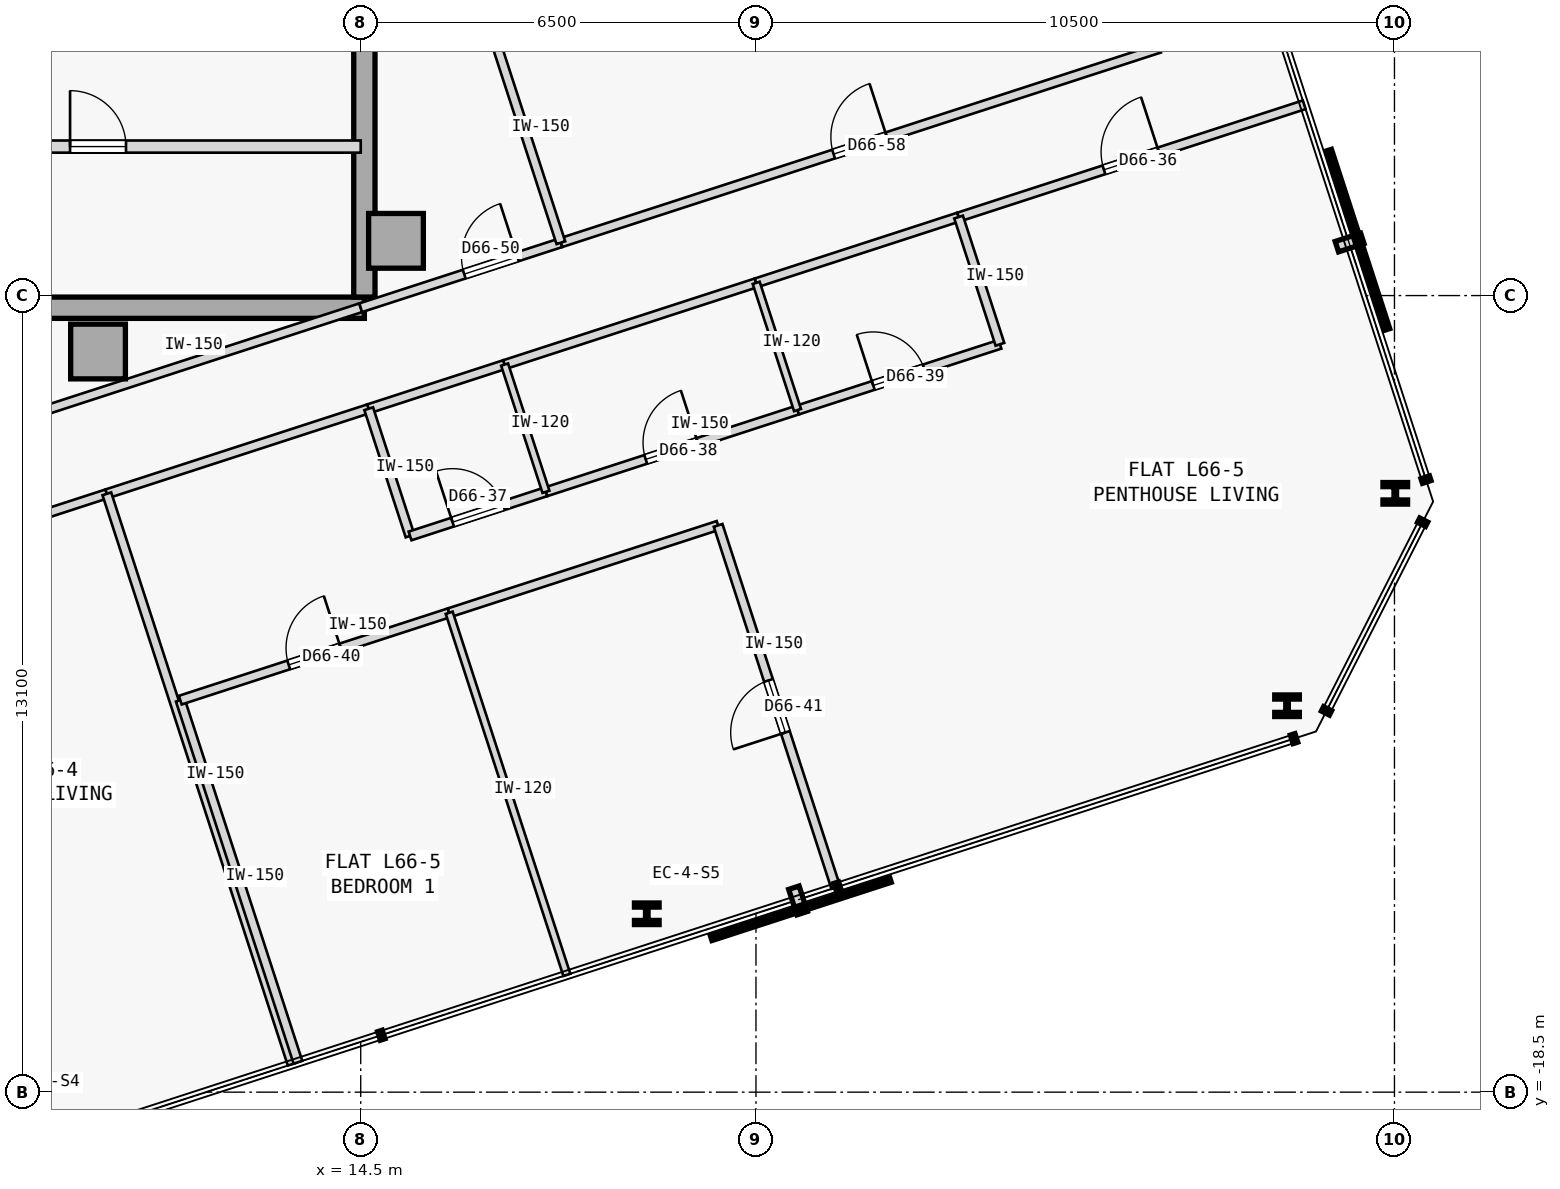
"""IFC4 building model, lengths in metres.
Left out: names, types, materials, properties, quantities, classifications, styles, units other than length and angle.
Written with IfcOpenShell. Run it as: python <this file> out.ifc"""

import sys

from ifc_helpers import new_model, si_unit, direction, frame, frame_2d, origin, origin_2d, place, context, subcontext, project, spatial, rectangle, i_section, extrude, element, fill, save


model = new_model("IFC4")
c1 = context("Model", 3, precision=1e-05, world=origin(), true_north=direction((0.0, 1.0)))
c2 = subcontext(c1, "Body", "Model", "MODEL_VIEW")
j1 = project(units=[si_unit("LENGTHUNIT", "METRE"), si_unit("PLANEANGLEUNIT", "RADIAN")], contexts=[c1])
p1 = place(None, origin())
s1 = spatial("IfcSite", under=j1, at=p1, CompositionType="ELEMENT")
p2 = place(p1, origin())
s2 = spatial("IfcBuilding", under=s1, at=p2, CompositionType="ELEMENT")
p3 = place(p2, frame((0.0, 0.0, 247.75)))
s3 = spatial("IfcBuildingStorey", under=s2, at=p3, CompositionType="ELEMENT", Elevation=247.75)
for number, where, z_axis, x_axis in (
    (1, (15.08, -4.5, 0.0), (0.0, 0.0, 1.0), (1.0, 0.0, 0.0)),
    (2, (10.18, -6.32, 0.0), (0.0, 0.0, 1.0), (1.0, 0.0, 0.0)),
):
    element("IfcColumn", number, at=place(p3, frame(where, z_axis=z_axis, x_axis=x_axis)), inside=s3, PredefinedType="COLUMN", context=c2, shape_type="SweptSolid", body=[
        extrude(rectangle(XDim=0.9, YDim=0.9, at=origin_2d()), origin(), (0.0, 0.0, 1.0), 3.35),
    ])
p4 = place(p3, frame((3.7, -5.6, 0.0), z_axis=(0.0, 0.0, 1.0), x_axis=(1.0, 0.0, 0.0)))
e3 = element("IfcWall", 3, at=p4, inside=s3, PredefinedType="SHEAR", context=c2, shape_type="SweptSolid", body=[
    extrude(rectangle(XDim=10.86, YDim=0.35, at=frame_2d((5.43, 0.0))), origin(), (0.0, 0.0, 1.0), 3.125),
])
p5 = place(p3, frame((14.56, -5.425, 0.0), z_axis=(0.0, 0.0, 1.0), x_axis=(0.0, 1.0, 0.0)))
e4 = element("IfcWall", 4, at=p5, inside=s3, PredefinedType="SHEAR", context=c2, shape_type="SweptSolid", body=[
    extrude(rectangle(XDim=10.85, YDim=0.35, at=frame_2d((5.425, 0.0))), origin(), (0.0, 0.0, 1.0), 3.125),
])
for number, where, z_axis, x_axis in (
    (5, (19.204, -15.566, 0.0), (0.0, 0.0, 1.0), (1.0, 0.0, 0.0)),
    (6, (29.734, -12.145, 0.0), (0.0, 0.0, 1.0), (1.0, 0.0, 0.0)),
    (7, (31.513, -8.652, 0.0), (0.0, 0.0, 1.0), (1.0, 0.0, 0.0)),
):
    element("IfcColumn", number, at=place(p3, frame(where, z_axis=z_axis, x_axis=x_axis)), inside=s3, PredefinedType="COLUMN", context=c2, shape_type="SweptSolid", body=[
        extrude(i_section(OverallWidth=0.405, OverallDepth=0.355, WebThickness=0.042, FlangeThickness=0.068, FilletRadius=0.015, at=origin_2d()), origin(), (0.0, 0.0, 1.0), 3.35),
    ])
p6 = place(p3, frame((3.7, -2.95, 0.0), z_axis=(0.0, 0.0, 1.0), x_axis=(1.0, 0.0, 0.0)))
e8 = element("IfcWall", 8, at=p6, inside=s3, PredefinedType="STANDARD", context=c2, shape_type="SweptSolid", body=[
    extrude(rectangle(XDim=10.8, YDim=0.2, at=frame_2d((5.4, 0.0))), origin(), (0.0, 0.0, 1.0), 3.125),
])
p7 = place(p6, frame((0.53, 0.0, 0.0)))
e9 = element("IfcOpeningElement", 9, at=p7, cuts=e8, PredefinedType="OPENING", context=c2, shape_type="SweptSolid", body=[
    extrude(rectangle(XDim=1.1, YDim=2.15, at=frame_2d((0.55, 1.075))), frame((0.0, 0.11, 0.0), z_axis=(0.0, -1.0, 0.0), x_axis=(1.0, 0.0, 0.0)), (0.0, 0.0, 1.0), 0.22),
])
p8 = place(p6, frame((6.02, 0.0, 0.0)))
e10 = element("IfcOpeningElement", 10, at=p8, cuts=e8, PredefinedType="OPENING", context=c2, shape_type="SweptSolid", body=[
    extrude(rectangle(XDim=0.92, YDim=2.15, at=frame_2d((0.46, 1.075))), frame((0.0, 0.11, 0.0), z_axis=(0.0, -1.0, 0.0), x_axis=(1.0, 0.0, 0.0)), (0.0, 0.0, 1.0), 0.22),
])
p9 = place(p3, frame((5.174, -10.334, 0.0), z_axis=(0.0, 0.0, 1.0), x_axis=(0.951058579685, 0.30901064384, 0.0)))
e11 = element("IfcWall", 11, at=p9, inside=s3, PredefinedType="PARTITIONING", context=c2, shape_type="SweptSolid", body=[
    extrude(rectangle(XDim=5.416, YDim=0.15, at=frame_2d((2.708, 0.0))), origin(), (0.0, 0.0, 1.0), 3.125),
])
p10 = place(p9, frame((2.233, 0.0, 0.0)))
e12 = element("IfcOpeningElement", 12, at=p10, cuts=e11, PredefinedType="OPENING", context=c2, shape_type="SweptSolid", body=[
    extrude(rectangle(XDim=0.95, YDim=2.15, at=frame_2d((0.475, 1.075))), frame((0.0, 0.085, 0.0), z_axis=(0.0, -1.0, 0.0), x_axis=(1.0, 0.0, 0.0)), (0.0, 0.0, 1.0), 0.17),
])
p11 = place(p3, frame((10.325, -8.66, 0.0), z_axis=(0.0, 0.0, 1.0), x_axis=(0.95106061278, 0.309004386407, 0.0)))
e13 = element("IfcWall", 13, at=p11, inside=s3, PredefinedType="PARTITIONING", context=c2, shape_type="SweptSolid", body=[
    extrude(rectangle(XDim=4.528, YDim=0.15, at=frame_2d((2.264, 0.0))), origin(), (0.0, 0.0, 1.0), 3.125),
])
p12 = place(p3, frame((24.332, -4.109, 0.0), z_axis=(0.0, 0.0, 1.0), x_axis=(0.951058083458, 0.309012171103, 0.0)))
e14 = element("IfcWall", 14, at=p12, inside=s3, PredefinedType="PARTITIONING", context=c2, shape_type="SweptSolid", body=[
    extrude(rectangle(XDim=5.976, YDim=0.15, at=frame_2d((2.988, 0.0))), origin(), (0.0, 0.0, 1.0), 3.125),
])
p13 = place(p12, frame((2.513, 0.0, 0.0)))
e15 = element("IfcOpeningElement", 15, at=p13, cuts=e14, PredefinedType="OPENING", context=c2, shape_type="SweptSolid", body=[
    extrude(rectangle(XDim=0.95, YDim=2.15, at=frame_2d((0.475, 1.075))), frame((0.0, 0.085, 0.0), z_axis=(0.0, -1.0, 0.0), x_axis=(1.0, 0.0, 0.0)), (0.0, 0.0, 1.0), 0.17),
])
p14 = place(p3, frame((14.631, -7.261, 0.0), z_axis=(0.0, 0.0, 1.0), x_axis=(0.951066131077, 0.308987401554, 0.0)))
e16 = element("IfcWall", 16, at=p14, inside=s3, PredefinedType="PARTITIONING", context=c2, shape_type="SweptSolid", body=[
    extrude(rectangle(XDim=2.35, YDim=0.15, at=frame_2d((1.175, 0.0))), origin(), (0.0, 0.0, 1.0), 3.125),
])
p15 = place(p3, frame((16.866, -6.535, 0.0), z_axis=(0.0, 0.0, 1.0), x_axis=(0.951041492154, 0.309063230101, 0.0)))
e17 = element("IfcWall", 17, at=p15, inside=s3, PredefinedType="PARTITIONING", context=c2, shape_type="SweptSolid", body=[
    extrude(rectangle(XDim=4.35, YDim=0.15, at=frame_2d((2.175, 0.0))), origin(), (0.0, 0.0, 1.0), 3.125),
])
p16 = place(p3, frame((21.003, -5.19, 0.0), z_axis=(0.0, 0.0, 1.0), x_axis=(0.951055596592, 0.309019824916, 0.0)))
e18 = element("IfcWall", 18, at=p16, inside=s3, PredefinedType="PARTITIONING", context=c2, shape_type="SweptSolid", body=[
    extrude(rectangle(XDim=3.5, YDim=0.15, at=frame_2d((1.75, 0.0))), origin(), (0.0, 0.0, 1.0), 3.125),
])
p17 = place(p3, frame((7.588, -7.846, 0.0), z_axis=(0.0, 0.0, 1.0), x_axis=(0.951058013903, 0.309012385174, 0.0)))
e19 = element("IfcWall", 19, at=p17, inside=s3, PredefinedType="PARTITIONING", context=c2, shape_type="SweptSolid", body=[
    extrude(rectangle(XDim=7.267, YDim=0.15, at=frame_2d((3.634, 0.0))), origin(), (0.0, 0.0, 1.0), 3.125),
])
p18 = place(p17, frame((0.557, 0.0, 0.0)))
e20 = element("IfcOpeningElement", 20, at=p18, cuts=e19, PredefinedType="OPENING", context=c2, shape_type="SweptSolid", body=[
    extrude(rectangle(XDim=0.92, YDim=2.15, at=frame_2d((0.46, 1.075))), frame((0.0, 0.085, 0.0), z_axis=(0.0, -1.0, 0.0), x_axis=(1.0, 0.0, 0.0)), (0.0, 0.0, 1.0), 0.17),
])
p19 = place(p3, frame((14.5, -5.6, 0.0), z_axis=(0.0, 0.0, 1.0), x_axis=(0.951047546178, 0.309044600193, 0.0)))
e21 = element("IfcWall", 21, at=p19, inside=s3, PredefinedType="PARTITIONING", context=c2, shape_type="SweptSolid", body=[
    extrude(rectangle(XDim=3.461, YDim=0.15, at=frame_2d((1.73, 0.0))), origin(), (0.0, 0.0, 1.0), 3.125),
])
p20 = place(p19, frame((1.79, 0.0, 0.0)))
e22 = element("IfcOpeningElement", 22, at=p20, cuts=e21, PredefinedType="OPENING", context=c2, shape_type="SweptSolid", body=[
    extrude(rectangle(XDim=0.92, YDim=2.15, at=frame_2d((0.46, 1.075))), frame((0.0, 0.085, 0.0), z_axis=(0.0, -1.0, 0.0), x_axis=(1.0, 0.0, 0.0)), (0.0, 0.0, 1.0), 0.17),
])
p21 = place(p3, frame((17.791, -4.531, 0.0), z_axis=(0.0, 0.0, 1.0), x_axis=(0.951056769902, 0.309016213852, 0.0)))
e23 = element("IfcWall", 23, at=p21, inside=s3, PredefinedType="PARTITIONING", context=c2, shape_type="SweptSolid", body=[
    extrude(rectangle(XDim=10.352, YDim=0.15, at=frame_2d((5.176, 0.0))), origin(), (0.0, 0.0, 1.0), 3.125),
])
p22 = place(p21, frame((4.716, 0.0, 0.0)))
e24 = element("IfcOpeningElement", 24, at=p22, cuts=e23, PredefinedType="OPENING", context=c2, shape_type="SweptSolid", body=[
    extrude(rectangle(XDim=0.92, YDim=2.15, at=frame_2d((0.46, 1.075))), frame((0.0, 0.085, 0.0), z_axis=(0.0, -1.0, 0.0), x_axis=(1.0, 0.0, 0.0)), (0.0, 0.0, 1.0), 0.17),
])
p23 = place(p3, frame((13.372, -18.04, 0.0), z_axis=(0.0, 0.0, 1.0), x_axis=(-0.308999867152, 0.951062081097, 0.0)))
e25 = element("IfcWall", 25, at=p23, inside=s3, PredefinedType="PARTITIONING", context=c2, shape_type="SweptSolid", body=[
    extrude(rectangle(XDim=9.862, YDim=0.15, at=frame_2d((4.931, 0.0))), origin(), (0.0, 0.0, 1.0), 3.125),
])
p24 = place(p3, frame((15.311, -9.353, 0.0), z_axis=(0.0, 0.0, 1.0), x_axis=(-0.308960600764, 0.951074837842, 0.0)))
e26 = element("IfcWall", 26, at=p24, inside=s3, PredefinedType="PARTITIONING", context=c2, shape_type="SweptSolid", body=[
    extrude(rectangle(XDim=2.2, YDim=0.15, at=frame_2d((1.1, 0.0))), origin(), (0.0, 0.0, 1.0), 3.125),
])
p25 = place(p3, frame((15.311, -9.353, 0.0), z_axis=(0.0, 0.0, 1.0), x_axis=(0.951076048914, 0.308956872689, 0.0)))
e27 = element("IfcWall", 27, at=p25, inside=s3, PredefinedType="PARTITIONING", context=c2, shape_type="SweptSolid", body=[
    extrude(rectangle(XDim=2.35, YDim=0.15, at=frame_2d((1.175, 0.0))), origin(), (0.0, 0.0, 1.0), 3.125),
])
p26 = place(p25, frame((0.735, 0.0, 0.0)))
e28 = element("IfcOpeningElement", 28, at=p26, cuts=e27, PredefinedType="OPENING", context=c2, shape_type="SweptSolid", body=[
    extrude(rectangle(XDim=0.88, YDim=2.15, at=frame_2d((0.44, 1.075))), frame((0.0, 0.085, 0.0), z_axis=(0.0, -1.0, 0.0), x_axis=(1.0, 0.0, 0.0)), (0.0, 0.0, 1.0), 0.17),
])
p27 = place(p3, frame((17.546, -8.627, 0.0), z_axis=(0.0, 0.0, 1.0), x_axis=(0.951052627573, 0.309028962374, 0.0)))
e29 = element("IfcWall", 29, at=p27, inside=s3, PredefinedType="PARTITIONING", context=c2, shape_type="SweptSolid", body=[
    extrude(rectangle(XDim=4.35, YDim=0.15, at=frame_2d((2.175, 0.0))), origin(), (0.0, 0.0, 1.0), 3.125),
])
p28 = place(p27, frame((1.725, 0.0, 0.0)))
e30 = element("IfcOpeningElement", 30, at=p28, cuts=e29, PredefinedType="OPENING", context=c2, shape_type="SweptSolid", body=[
    extrude(rectangle(XDim=0.9, YDim=2.15, at=frame_2d((0.45, 1.075))), frame((0.0, 0.085, 0.0), z_axis=(0.0, -1.0, 0.0), x_axis=(1.0, 0.0, 0.0)), (0.0, 0.0, 1.0), 0.17),
])
p29 = place(p3, frame((21.683, -7.283, 0.0), z_axis=(0.0, 0.0, 1.0), x_axis=(0.951062257173, 0.308999325213, 0.0)))
e31 = element("IfcWall", 31, at=p29, inside=s3, PredefinedType="PARTITIONING", context=c2, shape_type="SweptSolid", body=[
    extrude(rectangle(XDim=3.5, YDim=0.15, at=frame_2d((1.75, 0.0))), origin(), (0.0, 0.0, 1.0), 3.125),
])
p30 = place(p29, frame((1.31, 0.0, 0.0)))
e32 = element("IfcOpeningElement", 32, at=p30, cuts=e31, PredefinedType="OPENING", context=c2, shape_type="SweptSolid", body=[
    extrude(rectangle(XDim=0.88, YDim=2.15, at=frame_2d((0.44, 1.075))), frame((0.0, 0.085, 0.0), z_axis=(0.0, -1.0, 0.0), x_axis=(1.0, 0.0, 0.0)), (0.0, 0.0, 1.0), 0.17),
])
p31 = place(p3, frame((25.012, -6.201, 0.0), z_axis=(0.0, 0.0, 1.0), x_axis=(-0.309028364152, 0.951052821956, 0.0)))
e33 = element("IfcWall", 33, at=p31, inside=s3, PredefinedType="PARTITIONING", context=c2, shape_type="SweptSolid", body=[
    extrude(rectangle(XDim=2.2, YDim=0.15, at=frame_2d((1.1, 0.0))), origin(), (0.0, 0.0, 1.0), 3.125),
])
p32 = place(p3, frame((13.468, -18.009, 0.0), z_axis=(0.0, 0.0, 1.0), x_axis=(-0.309013782848, 0.951057559777, 0.0)))
e34 = element("IfcWall", 34, at=p32, inside=s3, PredefinedType="PARTITIONING", context=c2, shape_type="SweptSolid", body=[
    extrude(rectangle(XDim=6.262, YDim=0.15, at=frame_2d((3.131, 0.0))), origin(), (0.0, 0.0, 1.0), 3.125),
])
p33 = place(p3, frame((11.532, -12.053, 0.0), z_axis=(0.0, 0.0, 1.0), x_axis=(0.951065702951, 0.308988719326, 0.0)))
e35 = element("IfcWall", 35, at=p33, inside=s3, PredefinedType="PARTITIONING", context=c2, shape_type="SweptSolid", body=[
    extrude(rectangle(XDim=4.65, YDim=0.15, at=frame_2d((2.325, 0.0))), origin(), (0.0, 0.0, 1.0), 3.125),
])
p34 = place(p33, frame((1.875, 0.0, 0.0)))
e36 = element("IfcOpeningElement", 36, at=p34, cuts=e35, PredefinedType="OPENING", context=c2, shape_type="SweptSolid", body=[
    extrude(rectangle(XDim=0.9, YDim=2.15, at=frame_2d((0.45, 1.075))), frame((0.0, 0.085, 0.0), z_axis=(0.0, -1.0, 0.0), x_axis=(1.0, 0.0, 0.0)), (0.0, 0.0, 1.0), 0.17),
])
p35 = place(p3, frame((15.955, -10.616, 0.0), z_axis=(0.0, 0.0, 1.0), x_axis=(0.951050272606, 0.309036209813, 0.0)))
e37 = element("IfcWall", 37, at=p35, inside=s3, PredefinedType="PARTITIONING", context=c2, shape_type="SweptSolid", body=[
    extrude(rectangle(XDim=4.65, YDim=0.15, at=frame_2d((2.325, 0.0))), origin(), (0.0, 0.0, 1.0), 3.125),
])
p36 = place(p3, frame((22.312, -15.135, 0.0), z_axis=(0.0, 0.0, 1.0), x_axis=(-0.309013782848, 0.951057559777, 0.0)))
e38 = element("IfcWall", 38, at=p36, inside=s3, PredefinedType="PARTITIONING", context=c2, shape_type="SweptSolid", body=[
    extrude(rectangle(XDim=6.262, YDim=0.15, at=frame_2d((3.131, 0.0))), origin(), (0.0, 0.0, 1.0), 3.125),
])
p37 = place(p36, frame((2.681, 0.0, 0.0)))
e39 = element("IfcOpeningElement", 39, at=p37, cuts=e38, PredefinedType="OPENING", context=c2, shape_type="SweptSolid", body=[
    extrude(rectangle(XDim=0.9, YDim=2.15, at=frame_2d((0.45, 1.075))), frame((0.0, 0.085, 0.0), z_axis=(0.0, -1.0, 0.0), x_axis=(1.0, 0.0, 0.0)), (0.0, 0.0, 1.0), 0.17),
])
p38 = place(p3, frame((17.546, -8.627, 0.0), z_axis=(0.0, 0.0, 1.0), x_axis=(-0.309060979314, 0.951042223598, 0.0)))
e40 = element("IfcWall", 40, at=p38, inside=s3, PredefinedType="PARTITIONING", context=c2, shape_type="SweptSolid", body=[
    extrude(rectangle(XDim=2.2, YDim=0.12, at=frame_2d((1.1, 0.0))), origin(), (0.0, 0.0, 1.0), 3.125),
])
p39 = place(p3, frame((21.683, -7.283, 0.0), z_axis=(0.0, 0.0, 1.0), x_axis=(-0.30892799396, 0.951085429679, 0.0)))
e41 = element("IfcWall", 41, at=p39, inside=s3, PredefinedType="PARTITIONING", context=c2, shape_type="SweptSolid", body=[
    extrude(rectangle(XDim=2.2, YDim=0.12, at=frame_2d((1.1, 0.0))), origin(), (0.0, 0.0, 1.0), 3.125),
])
p40 = place(p3, frame((17.89, -16.572, 0.0), z_axis=(0.0, 0.0, 1.0), x_axis=(-0.309013782848, 0.951057559777, 0.0)))
e42 = element("IfcWall", 42, at=p40, inside=s3, PredefinedType="PARTITIONING", context=c2, shape_type="SweptSolid", body=[
    extrude(rectangle(XDim=6.262, YDim=0.12, at=frame_2d((3.131, 0.0))), origin(), (0.0, 0.0, 1.0), 3.125),
])
p41 = place(p3, frame((17.791, -4.531, 0.0), z_axis=(0.0, 0.0, 1.0), x_axis=(-0.309018414265, 0.951056054944, 0.0)))
e43 = element("IfcWall", 43, at=p41, inside=s3, PredefinedType="PARTITIONING", context=c2, shape_type="SweptSolid", body=[
    extrude(rectangle(XDim=3.835, YDim=0.15, at=frame_2d((1.917, 0.0))), origin(), (0.0, 0.0, 1.0), 3.125),
])
p42 = place(p8, origin())
e44 = element("IfcDoor", 44, at=p42, inside=s3, OperationType="SINGLE_SWING_LEFT", PredefinedType="DOOR", context=c2, shape_type="SweptSolid", body=[
    extrude(rectangle(XDim=0.92, YDim=2.15, at=frame_2d((0.46, 1.075))), frame((0.0, 0.025, 0.0), z_axis=(0.0, -1.0, 0.0), x_axis=(1.0, 0.0, 0.0)), (0.0, 0.0, 1.0), 0.05),
])
fill(e10, e44)
p43 = place(p13, origin())
e45 = element("IfcDoor", 45, at=p43, inside=s3, OperationType="SINGLE_SWING_RIGHT", PredefinedType="DOOR", context=c2, shape_type="SweptSolid", body=[
    extrude(rectangle(XDim=0.95, YDim=2.15, at=frame_2d((0.475, 1.075))), frame((0.0, 0.025, 0.0), z_axis=(0.0, -1.0, 0.0), x_axis=(1.0, 0.0, 0.0)), (0.0, 0.0, 1.0), 0.05),
])
fill(e15, e45)
p44 = place(p26, origin())
e46 = element("IfcDoor", 46, at=p44, inside=s3, OperationType="SINGLE_SWING_LEFT", PredefinedType="DOOR", context=c2, shape_type="SweptSolid", body=[
    extrude(rectangle(XDim=0.88, YDim=2.15, at=frame_2d((0.44, 1.075))), frame((0.0, 0.025, 0.0), z_axis=(0.0, -1.0, 0.0), x_axis=(1.0, 0.0, 0.0)), (0.0, 0.0, 1.0), 0.05),
])
fill(e28, e46)
p45 = place(p28, origin())
e47 = element("IfcDoor", 47, at=p45, inside=s3, OperationType="SINGLE_SWING_RIGHT", PredefinedType="DOOR", context=c2, shape_type="SweptSolid", body=[
    extrude(rectangle(XDim=0.9, YDim=2.15, at=frame_2d((0.45, 1.075))), frame((0.0, 0.025, 0.0), z_axis=(0.0, -1.0, 0.0), x_axis=(1.0, 0.0, 0.0)), (0.0, 0.0, 1.0), 0.05),
])
fill(e30, e47)
p46 = place(p30, origin())
e48 = element("IfcDoor", 48, at=p46, inside=s3, OperationType="SINGLE_SWING_LEFT", PredefinedType="DOOR", context=c2, shape_type="SweptSolid", body=[
    extrude(rectangle(XDim=0.88, YDim=2.15, at=frame_2d((0.44, 1.075))), frame((0.0, 0.025, 0.0), z_axis=(0.0, -1.0, 0.0), x_axis=(1.0, 0.0, 0.0)), (0.0, 0.0, 1.0), 0.05),
])
fill(e32, e48)
p47 = place(p34, origin())
e49 = element("IfcDoor", 49, at=p47, inside=s3, OperationType="SINGLE_SWING_RIGHT", PredefinedType="DOOR", context=c2, shape_type="SweptSolid", body=[
    extrude(rectangle(XDim=0.9, YDim=2.15, at=frame_2d((0.45, 1.075))), frame((0.0, 0.025, 0.0), z_axis=(0.0, -1.0, 0.0), x_axis=(1.0, 0.0, 0.0)), (0.0, 0.0, 1.0), 0.05),
])
fill(e36, e49)
p48 = place(p37, origin())
e50 = element("IfcDoor", 50, at=p48, inside=s3, OperationType="SINGLE_SWING_LEFT", PredefinedType="DOOR", context=c2, shape_type="SweptSolid", body=[
    extrude(rectangle(XDim=0.9, YDim=2.15, at=frame_2d((0.45, 1.075))), frame((0.0, 0.025, 0.0), z_axis=(0.0, -1.0, 0.0), x_axis=(1.0, 0.0, 0.0)), (0.0, 0.0, 1.0), 0.05),
])
fill(e39, e50)
p49 = place(p20, origin())
e51 = element("IfcDoor", 51, at=p49, inside=s3, OperationType="SINGLE_SWING_RIGHT", PredefinedType="DOOR", context=c2, shape_type="SweptSolid", body=[
    extrude(rectangle(XDim=0.92, YDim=2.15, at=frame_2d((0.46, 1.075))), frame((0.0, 0.025, 0.0), z_axis=(0.0, -1.0, 0.0), x_axis=(1.0, 0.0, 0.0)), (0.0, 0.0, 1.0), 0.05),
])
fill(e22, e51)
p50 = place(p22, origin())
e52 = element("IfcDoor", 52, at=p50, inside=s3, OperationType="SINGLE_SWING_RIGHT", PredefinedType="DOOR", context=c2, shape_type="SweptSolid", body=[
    extrude(rectangle(XDim=0.92, YDim=2.15, at=frame_2d((0.46, 1.075))), frame((0.0, 0.025, 0.0), z_axis=(0.0, -1.0, 0.0), x_axis=(1.0, 0.0, 0.0)), (0.0, 0.0, 1.0), 0.05),
])
fill(e24, e52)
save(model, sys.argv[1])
